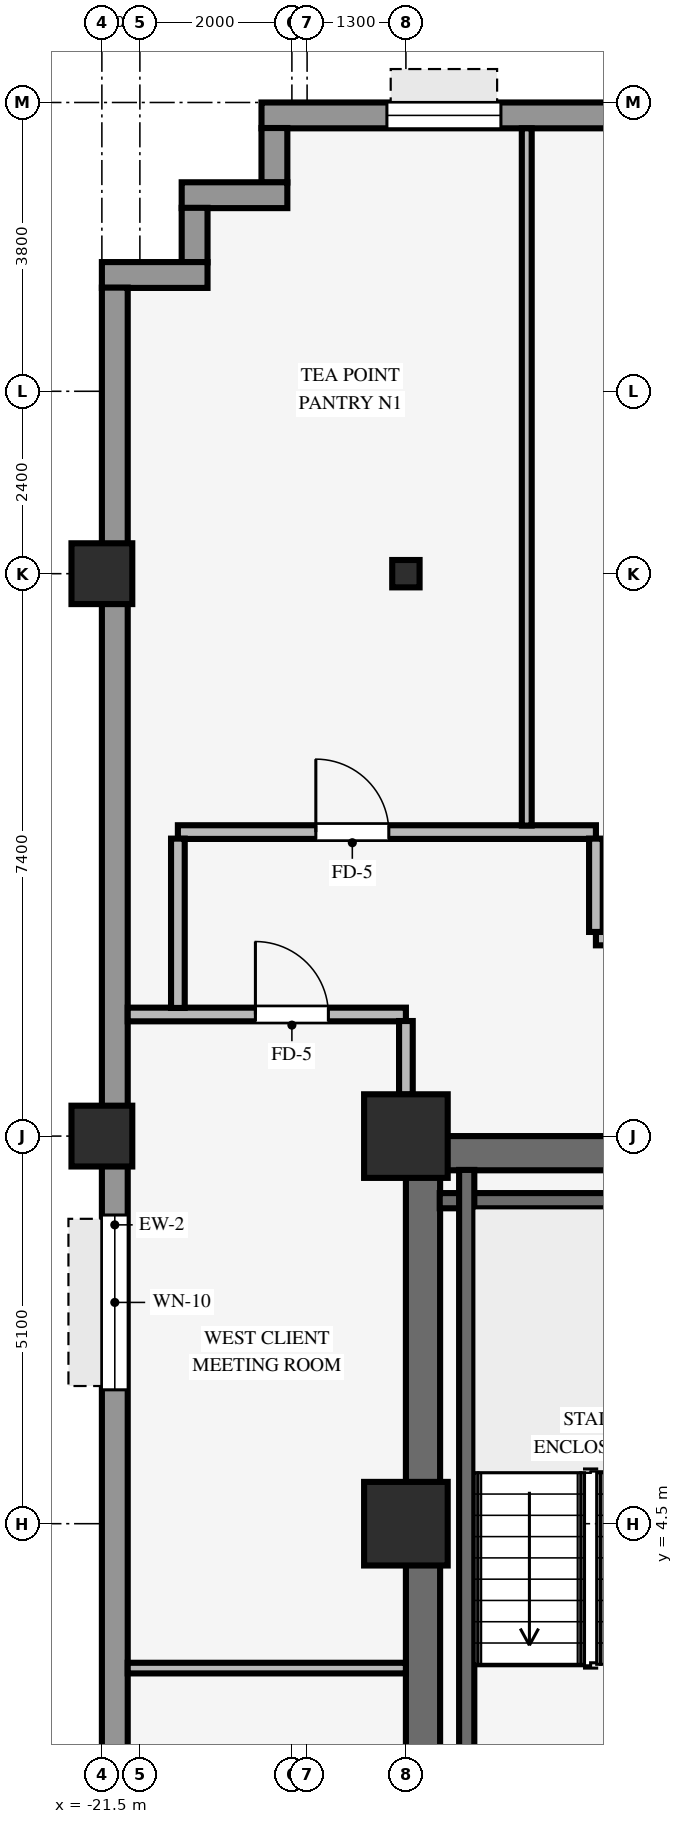
"""IFC4 building model, lengths in metres.
Left out: names, types, materials, properties, quantities, classifications, styles, units other than length and angle.
Written with IfcOpenShell. Run it as: python <this file> out.ifc"""

import sys

from ifc_helpers import new_model, si_unit, direction, frame, frame_2d, origin, origin_2d, place, context, subcontext, project, spatial, rectangle, hollow_rectangle, i_section, extrude, source, transform, mapped, element, fill, save


model = new_model("IFC4")
c1 = context("Model", 3, precision=1e-05, world=origin(), true_north=direction((0.0, 1.0)))
c2 = subcontext(c1, "Body", "Model", "MODEL_VIEW")
j1 = project(units=[si_unit("LENGTHUNIT", "METRE"), si_unit("PLANEANGLEUNIT", "RADIAN")], contexts=[c1])
p1 = place(None, origin())
s1 = spatial("IfcSite", under=j1, at=p1, CompositionType="ELEMENT")
p2 = place(p1, origin())
s2 = spatial("IfcBuilding", under=s1, at=p2, CompositionType="ELEMENT")
p3 = place(p2, frame((0.0, 0.0, 67.75)))
s3 = spatial("IfcBuildingStorey", under=s2, at=p3, CompositionType="ELEMENT", Elevation=67.75)
p4 = place(p3, frame((-17.5, 9.375, 0.0), z_axis=(0.0, 0.0, 1.0), x_axis=(1.0, 0.0, 0.0)))
e1 = element("IfcWall", 1, at=p4, inside=s3, PredefinedType="SHEAR", context=c2, shape_type="SweptSolid", body=[
    extrude(rectangle(XDim=8.5, YDim=0.45, at=frame_2d((4.25, 0.0))), origin(), (0.0, 0.0, 1.0), 3.37),
])
p5 = place(p3, frame((-17.275, -9.155, 0.0), z_axis=(0.0, 0.0, 1.0), x_axis=(0.0, 1.0, 0.0)))
e2 = element("IfcWall", 2, at=p5, inside=s3, PredefinedType="SHEAR", context=c2, shape_type="SweptSolid", body=[
    extrude(rectangle(XDim=18.31, YDim=0.45, at=frame_2d((9.155, 0.0))), origin(), (0.0, 0.0, 1.0), 3.37),
])
for number, where, z_axis, x_axis in (
    (3, (-17.5, 4.5, 0.0), (0.0, 0.0, 1.0), (1.0, 0.0, 0.0)),
    (4, (-17.5, 9.6, 0.0), (0.0, 0.0, 1.0), (1.0, 0.0, 0.0)),
):
    element("IfcColumn", number, at=place(p3, frame(where, z_axis=z_axis, x_axis=x_axis)), inside=s3, PredefinedType="COLUMN", context=c2, shape_type="SweptSolid", body=[
        extrude(rectangle(XDim=1.1, YDim=1.1, at=origin_2d()), origin(), (0.0, 0.0, 1.0), 3.37),
    ])
for number, where, z_axis, x_axis in (
    (5, (-21.5, 9.6, 0.0), (0.0, 0.0, 1.0), (1.0, 0.0, 0.0)),
    (6, (-21.5, 17.0, 0.0), (0.0, 0.0, 1.0), (1.0, 0.0, 0.0)),
):
    element("IfcColumn", number, at=place(p3, frame(where, z_axis=z_axis, x_axis=x_axis)), inside=s3, PredefinedType="COLUMN", context=c2, shape_type="SweptSolid", body=[
        extrude(hollow_rectangle(XDim=0.8, YDim=0.8, WallThickness=0.055, InnerFilletRadius=0.055, OuterFilletRadius=0.11, at=origin_2d()), origin(), (0.0, 0.0, 1.0), 3.37),
    ])
p6 = place(p3, frame((-17.5, 17.0, 0.0), z_axis=(0.0, 0.0, 1.0), x_axis=(1.0, 0.0, 0.0)))
e7 = element("IfcColumn", 7, at=p6, inside=s3, PredefinedType="COLUMN", context=c2, shape_type="SweptSolid", body=[
    extrude(i_section(OverallWidth=0.36, OverallDepth=0.36, WebThickness=0.021, FlangeThickness=0.021, FilletRadius=0.018, at=origin_2d()), origin(), (0.0, 0.0, 1.0), 3.37),
])
p7 = place(p3, frame((-19.4, 23.03, 0.0), z_axis=(0.0, 0.0, 1.0), x_axis=(1.0, 0.0, 0.0)))
e8 = element("IfcWall", 8, at=p7, inside=s3, PredefinedType="STANDARD", context=c2, shape_type="SweptSolid", body=[
    extrude(rectangle(XDim=38.8, YDim=0.34, at=frame_2d((19.4, 0.0))), origin(), (0.0, 0.0, 1.0), 2.705),
])
p8 = place(p7, frame((1.65, 0.0, 0.8)))
e9 = element("IfcOpeningElement", 9, at=p8, cuts=e8, PredefinedType="OPENING", context=c2, shape_type="SweptSolid", body=[
    extrude(rectangle(XDim=1.5, YDim=1.6, at=frame_2d((0.75, 0.8))), frame((0.0, 0.18, 0.0), z_axis=(0.0, -1.0, 0.0), x_axis=(1.0, 0.0, 0.0)), (0.0, 0.0, 1.0), 0.36),
])
p9 = place(p7, frame((7.15, 0.0, 0.8)))
e10 = element("IfcOpeningElement", 10, at=p9, cuts=e8, PredefinedType="OPENING", context=c2, shape_type="SweptSolid", body=[
    extrude(rectangle(XDim=1.5, YDim=1.6, at=frame_2d((0.75, 0.8))), frame((0.0, 0.18, 0.0), z_axis=(0.0, -1.0, 0.0), x_axis=(1.0, 0.0, 0.0)), (0.0, 0.0, 1.0), 0.36),
])
p10 = place(p7, frame((11.75, 0.0, 0.8)))
e11 = element("IfcOpeningElement", 11, at=p10, cuts=e8, PredefinedType="OPENING", context=c2, shape_type="SweptSolid", body=[
    extrude(rectangle(XDim=1.5, YDim=1.6, at=frame_2d((0.75, 0.8))), frame((0.0, 0.18, 0.0), z_axis=(0.0, -1.0, 0.0), x_axis=(1.0, 0.0, 0.0)), (0.0, 0.0, 1.0), 0.36),
])
p11 = place(p7, frame((16.35, 0.0, 0.8)))
e12 = element("IfcOpeningElement", 12, at=p11, cuts=e8, PredefinedType="OPENING", context=c2, shape_type="SweptSolid", body=[
    extrude(rectangle(XDim=1.5, YDim=1.6, at=frame_2d((0.75, 0.8))), frame((0.0, 0.18, 0.0), z_axis=(0.0, -1.0, 0.0), x_axis=(1.0, 0.0, 0.0)), (0.0, 0.0, 1.0), 0.36),
])
p12 = place(p7, frame((20.95, 0.0, 0.8)))
e13 = element("IfcOpeningElement", 13, at=p12, cuts=e8, PredefinedType="OPENING", context=c2, shape_type="SweptSolid", body=[
    extrude(rectangle(XDim=1.5, YDim=1.6, at=frame_2d((0.75, 0.8))), frame((0.0, 0.18, 0.0), z_axis=(0.0, -1.0, 0.0), x_axis=(1.0, 0.0, 0.0)), (0.0, 0.0, 1.0), 0.36),
])
p13 = place(p7, frame((25.55, 0.0, 0.8)))
e14 = element("IfcOpeningElement", 14, at=p13, cuts=e8, PredefinedType="OPENING", context=c2, shape_type="SweptSolid", body=[
    extrude(rectangle(XDim=1.5, YDim=1.6, at=frame_2d((0.75, 0.8))), frame((0.0, 0.18, 0.0), z_axis=(0.0, -1.0, 0.0), x_axis=(1.0, 0.0, 0.0)), (0.0, 0.0, 1.0), 0.36),
])
p14 = place(p7, frame((30.15, 0.0, 0.8)))
e15 = element("IfcOpeningElement", 15, at=p14, cuts=e8, PredefinedType="OPENING", context=c2, shape_type="SweptSolid", body=[
    extrude(rectangle(XDim=1.5, YDim=1.6, at=frame_2d((0.75, 0.8))), frame((0.0, 0.18, 0.0), z_axis=(0.0, -1.0, 0.0), x_axis=(1.0, 0.0, 0.0)), (0.0, 0.0, 1.0), 0.36),
])
p15 = place(p7, frame((34.75, 0.0, 0.8)))
e16 = element("IfcOpeningElement", 16, at=p15, cuts=e8, PredefinedType="OPENING", context=c2, shape_type="SweptSolid", body=[
    extrude(rectangle(XDim=1.5, YDim=1.6, at=frame_2d((0.75, 0.8))), frame((0.0, 0.18, 0.0), z_axis=(0.0, -1.0, 0.0), x_axis=(1.0, 0.0, 0.0)), (0.0, 0.0, 1.0), 0.36),
])
p16 = place(p3, frame((-19.23, 22.146, 0.0), z_axis=(0.0, 0.0, 1.0), x_axis=(0.0, 1.0, 0.0)))
e17 = element("IfcWall", 17, at=p16, inside=s3, PredefinedType="STANDARD", context=c2, shape_type="SweptSolid", body=[
    extrude(rectangle(XDim=0.718, YDim=0.34, at=frame_2d((0.359, 0.0))), origin(), (0.0, 0.0, 1.0), 3.36),
])
p17 = place(p3, frame((-20.45, 21.98, 0.0), z_axis=(0.0, 0.0, 1.0), x_axis=(1.0, 0.0, 0.0)))
e18 = element("IfcWall", 18, at=p17, inside=s3, PredefinedType="STANDARD", context=c2, shape_type="SweptSolid", body=[
    extrude(rectangle(XDim=1.39, YDim=0.34, at=frame_2d((0.695, 0.0))), origin(), (0.0, 0.0, 1.0), 3.36),
])
p18 = place(p3, frame((-20.28, 21.096, 0.0), z_axis=(0.0, 0.0, 1.0), x_axis=(0.0, 1.0, 0.0)))
e19 = element("IfcWall", 19, at=p18, inside=s3, PredefinedType="STANDARD", context=c2, shape_type="SweptSolid", body=[
    extrude(rectangle(XDim=0.718, YDim=0.34, at=frame_2d((0.359, 0.0))), origin(), (0.0, 0.0, 1.0), 3.36),
])
p19 = place(p3, frame((-21.5, 20.93, 0.0), z_axis=(0.0, 0.0, 1.0), x_axis=(1.0, 0.0, 0.0)))
e20 = element("IfcWall", 20, at=p19, inside=s3, PredefinedType="STANDARD", context=c2, shape_type="SweptSolid", body=[
    extrude(rectangle(XDim=1.39, YDim=0.34, at=frame_2d((0.695, 0.0))), origin(), (0.0, 0.0, 1.0), 3.36),
])
p20 = place(p3, frame((-21.33, -20.764, 0.0), z_axis=(0.0, 0.0, 1.0), x_axis=(0.0, 1.0, 0.0)))
e21 = element("IfcWall", 21, at=p20, inside=s3, PredefinedType="STANDARD", context=c2, shape_type="SweptSolid", body=[
    extrude(rectangle(XDim=41.528, YDim=0.34, at=frame_2d((20.764, 0.0))), origin(), (0.0, 0.0, 1.0), 2.705),
])
p21 = place(p20, frame((15.364, 0.0, 0.0)))
e22 = element("IfcOpeningElement", 22, at=p21, cuts=e21, PredefinedType="OPENING", context=c2, shape_type="SweptSolid", body=[
    extrude(rectangle(XDim=1.05, YDim=2.1, at=frame_2d((0.525, 1.05))), frame((0.0, 0.18, 0.0), z_axis=(0.0, -1.0, 0.0), x_axis=(1.0, 0.0, 0.0)), (0.0, 0.0, 1.0), 0.36),
])
p22 = place(p20, frame((12.202, 0.0, 0.8)))
e23 = element("IfcOpeningElement", 23, at=p22, cuts=e21, PredefinedType="OPENING", context=c2, shape_type="SweptSolid", body=[
    extrude(rectangle(XDim=2.3, YDim=1.62, at=frame_2d((1.15, 0.81))), frame((0.0, 0.18, 0.0), z_axis=(0.0, -1.0, 0.0), x_axis=(1.0, 0.0, 0.0)), (0.0, 0.0, 1.0), 0.36),
])
p23 = place(p20, frame((17.144, 0.0, 0.8)))
e24 = element("IfcOpeningElement", 24, at=p23, cuts=e21, PredefinedType="OPENING", context=c2, shape_type="SweptSolid", body=[
    extrude(rectangle(XDim=2.3, YDim=1.62, at=frame_2d((1.15, 0.81))), frame((0.0, 0.18, 0.0), z_axis=(0.0, -1.0, 0.0), x_axis=(1.0, 0.0, 0.0)), (0.0, 0.0, 1.0), 0.36),
])
p24 = place(p20, frame((27.025, 0.0, 0.8)))
e25 = element("IfcOpeningElement", 25, at=p24, cuts=e21, PredefinedType="OPENING", context=c2, shape_type="SweptSolid", body=[
    extrude(rectangle(XDim=2.3, YDim=1.62, at=frame_2d((1.15, 0.81))), frame((0.0, 0.18, 0.0), z_axis=(0.0, -1.0, 0.0), x_axis=(1.0, 0.0, 0.0)), (0.0, 0.0, 1.0), 0.36),
])
p25 = place(p3, frame((-17.055, 8.75, 0.0), z_axis=(0.0, 0.0, 1.0), x_axis=(1.0, 0.0, 0.0)))
e26 = element("IfcWall", 26, at=p25, inside=s3, PredefinedType="SHEAR", context=c2, shape_type="SweptSolid", body=[
    extrude(rectangle(XDim=3.52, YDim=0.2, at=frame_2d((1.76, 0.0))), origin(), (0.0, 0.0, 1.0), 3.37),
])
p26 = place(p3, frame((-16.7, 1.095, 0.0), z_axis=(0.0, 0.0, 1.0), x_axis=(0.0, 1.0, 0.0)))
e27 = element("IfcWall", 27, at=p26, inside=s3, PredefinedType="SHEAR", context=c2, shape_type="SweptSolid", body=[
    extrude(rectangle(XDim=8.06, YDim=0.2, at=frame_2d((4.03, 0.0))), origin(), (0.0, 0.0, 1.0), 3.37),
])
p27 = place(p3, frame((-21.16, 2.6, 0.0), z_axis=(0.0, 0.0, 1.0), x_axis=(1.0, 0.0, 0.0)))
e28 = element("IfcWall", 28, at=p27, inside=s3, PredefinedType="PARTITIONING", context=c2, shape_type="SweptSolid", body=[
    extrude(rectangle(XDim=3.66, YDim=0.14, at=frame_2d((1.83, 0.0))), origin(), (0.0, 0.0, 1.0), 3.36),
])
p28 = place(p3, frame((-21.16, 11.2, 0.0), z_axis=(0.0, 0.0, 1.0), x_axis=(1.0, 0.0, 0.0)))
e29 = element("IfcWall", 29, at=p28, inside=s3, PredefinedType="PARTITIONING", context=c2, shape_type="SweptSolid", body=[
    extrude(rectangle(XDim=3.66, YDim=0.18, at=frame_2d((1.83, 0.0))), origin(), (0.0, 0.0, 1.0), 3.36),
])
p29 = place(p28, frame((1.68, 0.0, 0.0)))
e30 = element("IfcOpeningElement", 30, at=p29, cuts=e29, PredefinedType="OPENING", context=c2, shape_type="SweptSolid", body=[
    extrude(rectangle(XDim=0.96, YDim=2.1, at=frame_2d((0.48, 1.05))), frame((0.0, 0.1, 0.0), z_axis=(0.0, -1.0, 0.0), x_axis=(1.0, 0.0, 0.0)), (0.0, 0.0, 1.0), 0.2),
])
p30 = place(p3, frame((-15.0, 12.2, 0.0), z_axis=(0.0, 0.0, 1.0), x_axis=(1.0, 0.0, 0.0)))
e31 = element("IfcWall", 31, at=p30, inside=s3, PredefinedType="PARTITIONING", context=c2, shape_type="SweptSolid", body=[
    extrude(rectangle(XDim=30.0, YDim=0.18, at=frame_2d((15.0, 0.0))), origin(), (0.0, 0.0, 1.0), 3.36),
])
p31 = place(p30, frame((2.195, 0.0, 0.0)))
e32 = element("IfcOpeningElement", 32, at=p31, cuts=e31, PredefinedType="OPENING", context=c2, shape_type="SweptSolid", body=[
    extrude(rectangle(XDim=0.96, YDim=2.1, at=frame_2d((0.48, 1.05))), frame((0.0, 0.1, 0.0), z_axis=(0.0, -1.0, 0.0), x_axis=(1.0, 0.0, 0.0)), (0.0, 0.0, 1.0), 0.2),
])
p32 = place(p30, frame((16.395, 0.0, 0.0)))
e33 = element("IfcOpeningElement", 33, at=p32, cuts=e31, PredefinedType="OPENING", context=c2, shape_type="SweptSolid", body=[
    extrude(rectangle(XDim=0.96, YDim=2.1, at=frame_2d((0.48, 1.05))), frame((0.0, 0.1, 0.0), z_axis=(0.0, -1.0, 0.0), x_axis=(1.0, 0.0, 0.0)), (0.0, 0.0, 1.0), 0.2),
])
p33 = place(p30, frame((21.62, 0.0, 0.0)))
e34 = element("IfcOpeningElement", 34, at=p33, cuts=e31, PredefinedType="OPENING", context=c2, shape_type="SweptSolid", body=[
    extrude(rectangle(XDim=0.96, YDim=2.1, at=frame_2d((0.48, 1.05))), frame((0.0, 0.1, 0.0), z_axis=(0.0, -1.0, 0.0), x_axis=(1.0, 0.0, 0.0)), (0.0, 0.0, 1.0), 0.2),
])
p34 = place(p30, frame((7.33, 0.0, 0.0)))
e35 = element("IfcOpeningElement", 35, at=p34, cuts=e31, PredefinedType="OPENING", context=c2, shape_type="SweptSolid", body=[
    extrude(rectangle(XDim=0.96, YDim=2.1, at=frame_2d((0.48, 1.05))), frame((0.0, 0.1, 0.0), z_axis=(0.0, -1.0, 0.0), x_axis=(1.0, 0.0, 0.0)), (0.0, 0.0, 1.0), 0.2),
])
p35 = place(p30, frame((26.08, 0.0, 0.0)))
e36 = element("IfcOpeningElement", 36, at=p35, cuts=e31, PredefinedType="OPENING", context=c2, shape_type="SweptSolid", body=[
    extrude(rectangle(XDim=0.96, YDim=2.1, at=frame_2d((0.48, 1.05))), frame((0.0, 0.1, 0.0), z_axis=(0.0, -1.0, 0.0), x_axis=(1.0, 0.0, 0.0)), (0.0, 0.0, 1.0), 0.2),
])
p36 = place(p30, frame((12.52, 0.0, 0.0)))
e37 = element("IfcOpeningElement", 37, at=p36, cuts=e31, PredefinedType="OPENING", context=c2, shape_type="SweptSolid", body=[
    extrude(rectangle(XDim=0.96, YDim=2.1, at=frame_2d((0.48, 1.05))), frame((0.0, 0.1, 0.0), z_axis=(0.0, -1.0, 0.0), x_axis=(1.0, 0.0, 0.0)), (0.0, 0.0, 1.0), 0.2),
])
p37 = place(p3, frame((-20.5, 13.6, 0.0), z_axis=(0.0, 0.0, 1.0), x_axis=(1.0, 0.0, 0.0)))
e38 = element("IfcWall", 38, at=p37, inside=s3, PredefinedType="PARTITIONING", context=c2, shape_type="SweptSolid", body=[
    extrude(rectangle(XDim=5.5, YDim=0.18, at=frame_2d((2.75, 0.0))), origin(), (0.0, 0.0, 1.0), 2.942),
])
p38 = place(p37, frame((1.815, 0.0, 0.0)))
e39 = element("IfcOpeningElement", 39, at=p38, cuts=e38, PredefinedType="OPENING", context=c2, shape_type="SweptSolid", body=[
    extrude(rectangle(XDim=0.96, YDim=2.1, at=frame_2d((0.48, 1.05))), frame((0.0, 0.1, 0.0), z_axis=(0.0, -1.0, 0.0), x_axis=(1.0, 0.0, 0.0)), (0.0, 0.0, 1.0), 0.2),
])
p39 = place(p3, frame((-20.5, 11.286, 0.0), z_axis=(0.0, 0.0, 1.0), x_axis=(0.0, 1.0, 0.0)))
e40 = element("IfcWall", 40, at=p39, inside=s3, PredefinedType="PARTITIONING", context=c2, shape_type="SweptSolid", body=[
    extrude(rectangle(XDim=2.228, YDim=0.18, at=frame_2d((1.114, 0.0))), origin(), (0.0, 0.0, 1.0), 3.36),
])
p40 = place(p3, frame((-17.5, 10.146, 0.0), z_axis=(0.0, 0.0, 1.0), x_axis=(0.0, 1.0, 0.0)))
e41 = element("IfcWall", 41, at=p40, inside=s3, PredefinedType="PARTITIONING", context=c2, shape_type="SweptSolid", body=[
    extrude(rectangle(XDim=0.968, YDim=0.18, at=frame_2d((0.484, 0.0))), origin(), (0.0, 0.0, 1.0), 2.738),
])
p41 = place(p3, frame((-15.91, 13.686, 0.0), z_axis=(0.0, 0.0, 1.0), x_axis=(0.0, 1.0, 0.0)))
e42 = element("IfcWall", 42, at=p41, inside=s3, PredefinedType="PARTITIONING", context=c2, shape_type="SweptSolid", body=[
    extrude(rectangle(XDim=9.174, YDim=0.13, at=frame_2d((4.587, 0.0))), origin(), (0.0, 0.0, 1.0), 3.36),
])
p42 = place(p3, frame((-15.0, 12.286, 0.0), z_axis=(0.0, 0.0, 1.0), x_axis=(0.0, 1.0, 0.0)))
e43 = element("IfcWall", 43, at=p42, inside=s3, PredefinedType="PARTITIONING", context=c2, shape_type="SweptSolid", body=[
    extrude(rectangle(XDim=1.228, YDim=0.18, at=frame_2d((0.614, 0.0))), origin(), (0.0, 0.0, 1.0), 3.36),
])
m1 = source(origin(), c2, "Body", "SweptSolid", [
    extrude(rectangle(XDim=1.5, YDim=1.6, at=frame_2d((0.75, 0.8))), frame((0.0, 0.03, 0.0), z_axis=(0.0, -1.0, 0.0), x_axis=(1.0, 0.0, 0.0)), (0.0, 0.0, 1.0), 0.06),
])
p43 = place(p8, origin())
e44 = element("IfcWindow", 44, at=p43, inside=s3, PartitioningType="SINGLE_PANEL", PredefinedType="WINDOW", context=c2, shape_type="MappedRepresentation", body=[
    mapped(m1, transform((0.0, 0.0, 0.0), scale=1.0)),
])
fill(e9, e44)
m2 = source(origin(), c2, "Body", "SweptSolid", [
    extrude(rectangle(XDim=2.3, YDim=1.62, at=frame_2d((1.15, 0.81))), frame((0.0, 0.03, 0.0), z_axis=(0.0, -1.0, 0.0), x_axis=(1.0, 0.0, 0.0)), (0.0, 0.0, 1.0), 0.06),
])
p44 = place(p24, origin())
e45 = element("IfcWindow", 45, at=p44, inside=s3, PartitioningType="SINGLE_PANEL", PredefinedType="WINDOW", context=c2, shape_type="MappedRepresentation", body=[
    mapped(m2, transform((0.0, 0.0, 0.0), scale=1.0)),
])
fill(e25, e45)
m3 = source(origin(), c2, "Body", "SweptSolid", [
    extrude(rectangle(XDim=0.96, YDim=2.1, at=frame_2d((0.48, 1.05))), frame((0.0, 0.025, 0.0), z_axis=(0.0, -1.0, 0.0), x_axis=(1.0, 0.0, 0.0)), (0.0, 0.0, 1.0), 0.05),
])
p45 = place(p38, origin())
e46 = element("IfcDoor", 46, at=p45, inside=s3, OperationType="SINGLE_SWING_LEFT", PredefinedType="DOOR", context=c2, shape_type="MappedRepresentation", body=[
    mapped(m3, transform((0.0, 0.0, 0.0), scale=1.0)),
])
fill(e39, e46)
p46 = place(p29, origin())
e47 = element("IfcDoor", 47, at=p46, inside=s3, OperationType="SINGLE_SWING_LEFT", PredefinedType="DOOR", context=c2, shape_type="MappedRepresentation", body=[
    mapped(m3, transform((0.0, 0.0, 0.0), scale=1.0)),
])
fill(e30, e47)
save(model, sys.argv[1])
